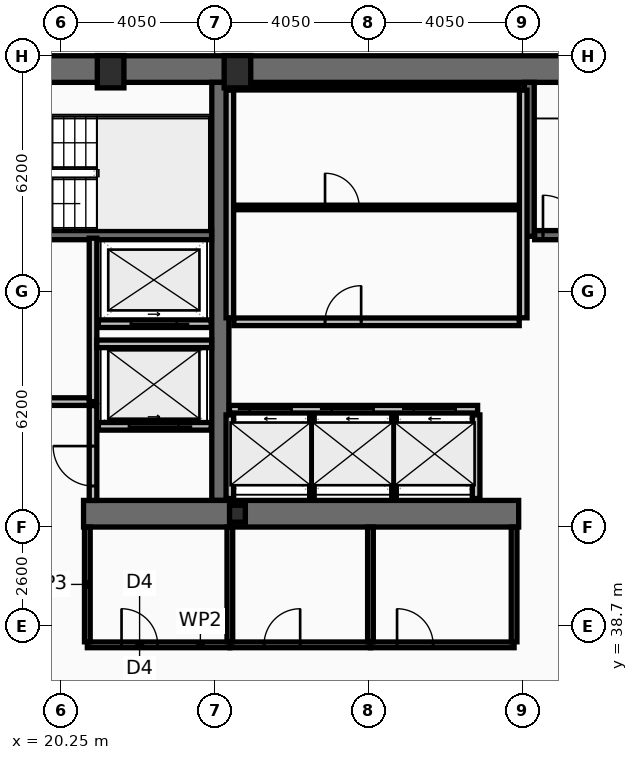
"""IFC4 building model, lengths in metres.
Left out: names, types, materials, properties, quantities, classifications, styles, units other than length and angle.
Written with IfcOpenShell. Run it as: python <this file> out.ifc"""

import sys

from ifc_helpers import new_model, si_unit, direction, frame, frame_2d, origin, origin_2d, place, context, subcontext, project, spatial, rectangle, hollow_rectangle, i_section, extrude, element, fill, save


model = new_model("IFC4")
c1 = context("Model", 3, precision=1e-05, world=origin(), true_north=direction((0.0, 1.0)))
c2 = subcontext(c1, "Body", "Model", "MODEL_VIEW")
j1 = project(units=[si_unit("LENGTHUNIT", "METRE"), si_unit("PLANEANGLEUNIT", "RADIAN")], contexts=[c1])
p1 = place(None, origin())
s1 = spatial("IfcSite", under=j1, at=p1, CompositionType="ELEMENT")
p2 = place(p1, origin())
s2 = spatial("IfcBuilding", under=s1, at=p2, CompositionType="ELEMENT")
p3 = place(p2, frame((0.0, 0.0, 132.6)))
s3 = spatial("IfcBuildingStorey", under=s2, at=p3, CompositionType="ELEMENT", Elevation=132.6)
p4 = place(p3, frame((16.2, 53.35, 0.0), z_axis=(0.0, 0.0, 1.0), x_axis=(1.0, 0.0, 0.0)))
e1 = element("IfcWall", 1, at=p4, inside=s3, PredefinedType="SHEAR", context=c2, shape_type="SweptSolid", body=[
    extrude(rectangle(XDim=40.5, YDim=0.7, at=frame_2d((20.25, 0.0))), origin(), (0.0, 0.0, 1.0), 3.44),
])
p5 = place(p3, frame((24.45, 42.0, 0.0), z_axis=(0.0, 0.0, 1.0), x_axis=(0.0, 1.0, 0.0)))
e2 = element("IfcWall", 2, at=p5, inside=s3, PredefinedType="SHEAR", context=c2, shape_type="SweptSolid", body=[
    extrude(rectangle(XDim=11.0, YDim=0.45, at=frame_2d((5.5, 0.0))), origin(), (0.0, 0.0, 1.0), 3.44),
])
p6 = place(p3, frame((32.3, 41.65, 0.0), z_axis=(0.0, 0.0, 1.0), x_axis=(-1.0, 0.0, 0.0)))
e3 = element("IfcWall", 3, at=p6, inside=s3, PredefinedType="SHEAR", context=c2, shape_type="SweptSolid", body=[
    extrude(rectangle(XDim=11.45, YDim=0.7, at=frame_2d((5.725, 0.0))), origin(), (0.0, 0.0, 1.0), 3.44),
])
p7 = place(p3, frame((32.58, 48.95, 0.0), z_axis=(0.0, 0.0, 1.0), x_axis=(0.0, 1.0, 0.0)))
e4 = element("IfcWall", 4, at=p7, inside=s3, PredefinedType="SHEAR", context=c2, shape_type="SweptSolid", body=[
    extrude(rectangle(XDim=4.05, YDim=0.26, at=frame_2d((2.025, 0.0))), origin(), (0.0, 0.0, 1.0), 3.44),
])
p8 = place(p3, frame((16.9, 48.98, 0.0), z_axis=(0.0, 0.0, 1.0), x_axis=(1.0, 0.0, 0.0)))
e5 = element("IfcWall", 5, at=p8, inside=s3, PredefinedType="SHEAR", context=c2, shape_type="SweptSolid", body=[
    extrude(rectangle(XDim=7.32, YDim=0.24, at=frame_2d((3.66, 0.0))), origin(), (0.0, 0.0, 1.0), 3.44),
])
p9 = place(p8, frame((0.22, 0.0, 0.0)))
e6 = element("IfcOpeningElement", 6, at=p9, cuts=e5, PredefinedType="OPENING", context=c2, shape_type="SweptSolid", body=[
    extrude(rectangle(XDim=1.05, YDim=2.15, at=frame_2d((0.525, 1.075))), frame((0.0, 0.13, 0.0), z_axis=(0.0, -1.0, 0.0), x_axis=(1.0, 0.0, 0.0)), (0.0, 0.0, 1.0), 0.26),
])
p10 = place(p3, frame((32.72, 48.98, 0.0), z_axis=(0.0, 0.0, 1.0), x_axis=(1.0, 0.0, 0.0)))
e7 = element("IfcWall", 7, at=p10, inside=s3, PredefinedType="SHEAR", context=c2, shape_type="SweptSolid", body=[
    extrude(rectangle(XDim=7.56, YDim=0.24, at=frame_2d((3.78, 0.0))), origin(), (0.0, 0.0, 1.0), 3.44),
])
p11 = place(p10, frame((0.22, 0.0, 0.0)))
e8 = element("IfcOpeningElement", 8, at=p11, cuts=e7, PredefinedType="OPENING", context=c2, shape_type="SweptSolid", body=[
    extrude(rectangle(XDim=1.05, YDim=2.15, at=frame_2d((0.525, 1.075))), frame((0.0, 0.13, 0.0), z_axis=(0.0, -1.0, 0.0), x_axis=(1.0, 0.0, 0.0)), (0.0, 0.0, 1.0), 0.26),
])
for number, where, z_axis, x_axis in (
    (9, (21.562, 53.28, 0.0), (0.0, 0.0, 1.0), (1.0, 0.0, 0.0)),
    (10, (24.9, 53.28, 0.0), (0.0, 0.0, 1.0), (1.0, 0.0, 0.0)),
):
    element("IfcColumn", number, at=place(p3, frame(where, z_axis=z_axis, x_axis=x_axis)), inside=s3, PredefinedType="COLUMN", context=c2, shape_type="SweptSolid", body=[
        extrude(hollow_rectangle(XDim=0.7, YDim=0.85, WallThickness=0.05, at=origin_2d()), origin(), (0.0, 0.0, 1.0), 3.6),
    ])
p12 = place(p3, frame((24.9, 41.65, 0.0), z_axis=(0.0, 0.0, 1.0), x_axis=(1.0, 0.0, 0.0)))
e11 = element("IfcColumn", 11, at=p12, inside=s3, PredefinedType="COLUMN", context=c2, shape_type="SweptSolid", body=[
    extrude(i_section(OverallWidth=0.416, OverallDepth=0.446, WebThickness=0.039, FlangeThickness=0.063, at=origin_2d()), origin(), (0.0, 0.0, 1.0), 3.6),
])
p13 = place(p3, frame((24.69, 44.4, 0.0), z_axis=(0.0, 0.0, 1.0), x_axis=(1.0, 0.0, 0.0)))
e12 = element("IfcWall", 12, at=p13, inside=s3, PredefinedType="PARTITIONING", context=c2, shape_type="SweptSolid", body=[
    extrude(rectangle(XDim=6.53, YDim=0.2, at=frame_2d((3.265, 0.0))), origin(), (0.0, 0.0, 1.0), 3.44),
])
p14 = place(p13, frame((0.53, 0.0, 0.0)))
e13 = element("IfcOpeningElement", 13, at=p14, cuts=e12, PredefinedType="OPENING", context=c2, shape_type="SweptSolid", body=[
    extrude(rectangle(XDim=1.1, YDim=2.18, at=frame_2d((0.55, 1.09))), frame((0.0, 0.11, 0.0), z_axis=(0.0, -1.0, 0.0), x_axis=(1.0, 0.0, 0.0)), (0.0, 0.0, 1.0), 0.22),
])
p15 = place(p13, frame((2.69, 0.0, 0.0)))
e14 = element("IfcOpeningElement", 14, at=p15, cuts=e12, PredefinedType="OPENING", context=c2, shape_type="SweptSolid", body=[
    extrude(rectangle(XDim=1.1, YDim=2.18, at=frame_2d((0.55, 1.09))), frame((0.0, 0.11, 0.0), z_axis=(0.0, -1.0, 0.0), x_axis=(1.0, 0.0, 0.0)), (0.0, 0.0, 1.0), 0.22),
])
p16 = place(p13, frame((4.85, 0.0, 0.0)))
e15 = element("IfcOpeningElement", 15, at=p16, cuts=e12, PredefinedType="OPENING", context=c2, shape_type="SweptSolid", body=[
    extrude(rectangle(XDim=1.1, YDim=2.18, at=frame_2d((0.55, 1.09))), frame((0.0, 0.11, 0.0), z_axis=(0.0, -1.0, 0.0), x_axis=(1.0, 0.0, 0.0)), (0.0, 0.0, 1.0), 0.22),
])
p17 = place(p3, frame((24.21, 43.95, 0.0), z_axis=(0.0, 0.0, 1.0), x_axis=(-1.0, 0.0, 0.0)))
e16 = element("IfcWall", 16, at=p17, inside=s3, PredefinedType="PARTITIONING", context=c2, shape_type="SweptSolid", body=[
    extrude(rectangle(XDim=2.97, YDim=0.2, at=frame_2d((1.485, 0.0))), origin(), (0.0, 0.0, 1.0), 3.44),
])
p18 = place(p17, frame((0.86, 0.0, 0.0)))
e17 = element("IfcOpeningElement", 17, at=p18, cuts=e16, PredefinedType="OPENING", context=c2, shape_type="SweptSolid", body=[
    extrude(rectangle(XDim=1.3, YDim=2.18, at=frame_2d((0.65, 1.09))), frame((0.0, 0.11, 0.0), z_axis=(0.0, -1.0, 0.0), x_axis=(1.0, 0.0, 0.0)), (0.0, 0.0, 1.0), 0.22),
])
p19 = place(p3, frame((24.21, 46.65, 0.0), z_axis=(0.0, 0.0, 1.0), x_axis=(-1.0, 0.0, 0.0)))
e18 = element("IfcWall", 18, at=p19, inside=s3, PredefinedType="PARTITIONING", context=c2, shape_type="SweptSolid", body=[
    extrude(rectangle(XDim=2.97, YDim=0.2, at=frame_2d((1.485, 0.0))), origin(), (0.0, 0.0, 1.0), 3.44),
])
p20 = place(p19, frame((0.91, 0.0, 0.0)))
e19 = element("IfcOpeningElement", 19, at=p20, cuts=e18, PredefinedType="OPENING", context=c2, shape_type="SweptSolid", body=[
    extrude(rectangle(XDim=1.2, YDim=2.18, at=frame_2d((0.6, 1.09))), frame((0.0, 0.11, 0.0), z_axis=(0.0, -1.0, 0.0), x_axis=(1.0, 0.0, 0.0)), (0.0, 0.0, 1.0), 0.22),
])
p21 = place(p3, frame((21.1, 44.6, 0.0), z_axis=(0.0, 0.0, 1.0), x_axis=(0.0, 1.0, 0.0)))
e20 = element("IfcWall", 20, at=p21, inside=s3, PredefinedType="PARTITIONING", context=c2, shape_type="SweptSolid", body=[
    extrude(rectangle(XDim=4.3, YDim=0.2, at=frame_2d((2.15, 0.0))), origin(), (0.0, 0.0, 1.0), 3.44),
])
p22 = place(p3, frame((16.9, 44.6, 0.0), z_axis=(0.0, 0.0, 1.0), x_axis=(1.0, 0.0, 0.0)))
e21 = element("IfcWall", 21, at=p22, inside=s3, PredefinedType="PARTITIONING", context=c2, shape_type="SweptSolid", body=[
    extrude(rectangle(XDim=4.1, YDim=0.2, at=frame_2d((2.05, 0.0))), origin(), (0.0, 0.0, 1.0), 3.44),
])
p23 = place(p22, frame((1.25, 0.0, 0.0)))
e22 = element("IfcOpeningElement", 22, at=p23, cuts=e21, PredefinedType="OPENING", context=c2, shape_type="SweptSolid", body=[
    extrude(rectangle(XDim=1.05, YDim=2.15, at=frame_2d((0.525, 1.075))), frame((0.0, 0.11, 0.0), z_axis=(0.0, -1.0, 0.0), x_axis=(1.0, 0.0, 0.0)), (0.0, 0.0, 1.0), 0.22),
])
p24 = place(p3, frame((21.2, 46.12, 0.0), z_axis=(0.0, 0.0, 1.0), x_axis=(1.0, 0.0, 0.0)))
e23 = element("IfcWall", 23, at=p24, inside=s3, PredefinedType="PARTITIONING", context=c2, shape_type="SweptSolid", body=[
    extrude(rectangle(XDim=3.02, YDim=0.2, at=frame_2d((1.51, 0.0))), origin(), (0.0, 0.0, 1.0), 3.44),
])
p25 = place(p3, frame((21.1, 42.0, 0.0), z_axis=(0.0, 0.0, 1.0), x_axis=(0.0, 1.0, 0.0)))
e24 = element("IfcWall", 24, at=p25, inside=s3, PredefinedType="PARTITIONING", context=c2, shape_type="SweptSolid", body=[
    extrude(rectangle(XDim=2.495, YDim=0.2, at=frame_2d((1.248, 0.0))), origin(), (0.0, 0.0, 1.0), 3.44),
])
p26 = place(p25, frame((0.38, 0.0, 0.0)))
e25 = element("IfcOpeningElement", 25, at=p26, cuts=e24, PredefinedType="OPENING", context=c2, shape_type="SweptSolid", body=[
    extrude(rectangle(XDim=1.05, YDim=2.15, at=frame_2d((0.525, 1.075))), frame((0.0, 0.11, 0.0), z_axis=(0.0, -1.0, 0.0), x_axis=(1.0, 0.0, 0.0)), (0.0, 0.0, 1.0), 0.22),
])
for number, where, z_axis, x_axis in (
    (26, (24.7, 46.805, 0.0), (0.0, 0.0, 1.0), (0.0, 1.0, 0.0)),
    (27, (32.42, 46.805, 0.0), (0.0, 0.0, 1.0), (0.0, 1.0, 0.0)),
):
    element("IfcWall", number, at=place(p3, frame(where, z_axis=z_axis, x_axis=x_axis)), inside=s3, PredefinedType="PARTITIONING", context=c2, shape_type="SweptSolid", body=[
        extrude(rectangle(XDim=5.99, YDim=0.2, at=frame_2d((2.995, 0.0))), origin(), (0.0, 0.0, 1.0), 3.44),
    ])
p27 = place(p3, frame((24.805, 52.86, 0.0), z_axis=(0.0, 0.0, 1.0), x_axis=(1.0, 0.0, 0.0)))
e28 = element("IfcWall", 28, at=p27, inside=s3, PredefinedType="PARTITIONING", context=c2, shape_type="SweptSolid", body=[
    extrude(rectangle(XDim=7.51, YDim=0.12, at=frame_2d((3.755, 0.0))), origin(), (0.0, 0.0, 1.0), 3.44),
])
p28 = place(p3, frame((24.805, 49.709, 0.0), z_axis=(0.0, 0.0, 1.0), x_axis=(1.0, 0.0, 0.0)))
e29 = element("IfcWall", 29, at=p28, inside=s3, PredefinedType="PARTITIONING", context=c2, shape_type="SweptSolid", body=[
    extrude(rectangle(XDim=7.51, YDim=0.12, at=frame_2d((3.755, 0.0))), origin(), (0.0, 0.0, 1.0), 3.44),
])
p29 = place(p28, frame((2.4, 0.0, 0.0)))
e30 = element("IfcOpeningElement", 30, at=p29, cuts=e29, PredefinedType="OPENING", context=c2, shape_type="SweptSolid", body=[
    extrude(rectangle(XDim=0.9, YDim=2.05, at=frame_2d((0.45, 1.025))), frame((0.0, 0.07, 0.0), z_axis=(0.0, -1.0, 0.0), x_axis=(1.0, 0.0, 0.0)), (0.0, 0.0, 1.0), 0.14),
])
p30 = place(p3, frame((24.805, 46.7, 0.0), z_axis=(0.0, 0.0, 1.0), x_axis=(1.0, 0.0, 0.0)))
e31 = element("IfcWall", 31, at=p30, inside=s3, PredefinedType="PARTITIONING", context=c2, shape_type="SweptSolid", body=[
    extrude(rectangle(XDim=7.51, YDim=0.2, at=frame_2d((3.755, 0.0))), origin(), (0.0, 0.0, 1.0), 3.44),
])
p31 = place(p30, frame((2.4, 0.0, 0.0)))
e32 = element("IfcOpeningElement", 32, at=p31, cuts=e31, PredefinedType="OPENING", context=c2, shape_type="SweptSolid", body=[
    extrude(rectangle(XDim=0.95, YDim=2.1, at=frame_2d((0.475, 1.05))), frame((0.0, 0.11, 0.0), z_axis=(0.0, -1.0, 0.0), x_axis=(1.0, 0.0, 0.0)), (0.0, 0.0, 1.0), 0.22),
])
for number, where, z_axis, x_axis in (
    (33, (24.7, 42.05, 0.0), (0.0, 0.0, 1.0), (0.0, 1.0, 0.0)),
    (34, (31.18, 42.05, 0.0), (0.0, 0.0, 1.0), (0.0, 1.0, 0.0)),
):
    element("IfcWall", number, at=place(p3, frame(where, z_axis=z_axis, x_axis=x_axis)), inside=s3, PredefinedType="PARTITIONING", context=c2, shape_type="SweptSolid", body=[
        extrude(rectangle(XDim=2.2, YDim=0.2, at=frame_2d((1.1, 0.0))), origin(), (0.0, 0.0, 1.0), 3.44),
    ])
for number, where, z_axis, x_axis in (
    (35, (26.86, 42.05, 0.0), (0.0, 0.0, 1.0), (0.0, 1.0, 0.0)),
    (36, (29.02, 42.05, 0.0), (0.0, 0.0, 1.0), (0.0, 1.0, 0.0)),
):
    element("IfcWall", number, at=place(p3, frame(where, z_axis=z_axis, x_axis=x_axis)), inside=s3, PredefinedType="PARTITIONING", context=c2, shape_type="SweptSolid", body=[
        extrude(rectangle(XDim=2.2, YDim=0.12, at=frame_2d((1.1, 0.0))), origin(), (0.0, 0.0, 1.0), 3.44),
    ])
p32 = place(p3, frame((20.95, 38.2, 0.0), z_axis=(0.0, 0.0, 1.0), x_axis=(1.0, 0.0, 0.0)))
e37 = element("IfcWall", 37, at=p32, inside=s3, PredefinedType="PARTITIONING", context=c2, shape_type="SweptSolid", body=[
    extrude(rectangle(XDim=3.75, YDim=0.15, at=frame_2d((1.875, 0.0))), origin(), (0.0, 0.0, 1.0), 2.73),
])
p33 = place(p32, frame((0.9, 0.0, 0.0)))
e38 = element("IfcOpeningElement", 38, at=p33, cuts=e37, PredefinedType="OPENING", context=c2, shape_type="SweptSolid", body=[
    extrude(rectangle(XDim=0.95, YDim=2.05, at=frame_2d((0.475, 1.025))), frame((0.0, 0.085, 0.0), z_axis=(0.0, -1.0, 0.0), x_axis=(1.0, 0.0, 0.0)), (0.0, 0.0, 1.0), 0.17),
])
p34 = place(p3, frame((24.7, 38.2, 0.0), z_axis=(0.0, 0.0, 1.0), x_axis=(1.0, 0.0, 0.0)))
e39 = element("IfcWall", 39, at=p34, inside=s3, PredefinedType="PARTITIONING", context=c2, shape_type="SweptSolid", body=[
    extrude(rectangle(XDim=3.7, YDim=0.15, at=frame_2d((1.85, 0.0))), origin(), (0.0, 0.0, 1.0), 2.73),
])
p35 = place(p34, frame((0.9, 0.0, 0.0)))
e40 = element("IfcOpeningElement", 40, at=p35, cuts=e39, PredefinedType="OPENING", context=c2, shape_type="SweptSolid", body=[
    extrude(rectangle(XDim=0.95, YDim=2.05, at=frame_2d((0.475, 1.025))), frame((0.0, 0.085, 0.0), z_axis=(0.0, -1.0, 0.0), x_axis=(1.0, 0.0, 0.0)), (0.0, 0.0, 1.0), 0.17),
])
p36 = place(p3, frame((28.4, 38.2, 0.0), z_axis=(0.0, 0.0, 1.0), x_axis=(1.0, 0.0, 0.0)))
e41 = element("IfcWall", 41, at=p36, inside=s3, PredefinedType="PARTITIONING", context=c2, shape_type="SweptSolid", body=[
    extrude(rectangle(XDim=3.78, YDim=0.15, at=frame_2d((1.89, 0.0))), origin(), (0.0, 0.0, 1.0), 2.73),
])
p37 = place(p36, frame((0.7, 0.0, 0.0)))
e42 = element("IfcOpeningElement", 42, at=p37, cuts=e41, PredefinedType="OPENING", context=c2, shape_type="SweptSolid", body=[
    extrude(rectangle(XDim=0.95, YDim=2.05, at=frame_2d((0.475, 1.025))), frame((0.0, 0.085, 0.0), z_axis=(0.0, -1.0, 0.0), x_axis=(1.0, 0.0, 0.0)), (0.0, 0.0, 1.0), 0.17),
])
p38 = place(p3, frame((20.95, 38.28, 0.0), z_axis=(0.0, 0.0, 1.0), x_axis=(0.0, 1.0, 0.0)))
e43 = element("IfcWall", 43, at=p38, inside=s3, PredefinedType="PARTITIONING", context=c2, shape_type="SweptSolid", body=[
    extrude(rectangle(XDim=3.02, YDim=0.15, at=frame_2d((1.51, 0.0))), origin(), (0.0, 0.0, 1.0), 3.44),
])
p39 = place(p3, frame((24.7, 38.28, 0.0), z_axis=(0.0, 0.0, 1.0), x_axis=(0.0, 1.0, 0.0)))
e44 = element("IfcWall", 44, at=p39, inside=s3, PredefinedType="PARTITIONING", context=c2, shape_type="SweptSolid", body=[
    extrude(rectangle(XDim=3.02, YDim=0.15, at=frame_2d((1.51, 0.0))), origin(), (0.0, 0.0, 1.0), 2.73),
])
for number, where, z_axis, x_axis in (
    (45, (28.4, 38.28, 0.0), (0.0, 0.0, 1.0), (0.0, 1.0, 0.0)),
    (46, (32.18, 38.28, 0.0), (0.0, 0.0, 1.0), (0.0, 1.0, 0.0)),
):
    element("IfcWall", number, at=place(p3, frame(where, z_axis=z_axis, x_axis=x_axis)), inside=s3, PredefinedType="PARTITIONING", context=c2, shape_type="SweptSolid", body=[
        extrude(rectangle(XDim=3.02, YDim=0.15, at=frame_2d((1.51, 0.0))), origin(), (0.0, 0.0, 1.0), 3.44),
    ])
p40 = place(p11, origin())
e47 = element("IfcDoor", 47, at=p40, inside=s3, OperationType="SINGLE_SWING_LEFT", PredefinedType="DOOR", context=c2, shape_type="SweptSolid", body=[
    extrude(rectangle(XDim=1.05, YDim=2.15, at=frame_2d((0.525, 1.075))), frame((0.0, 0.025, 0.0), z_axis=(0.0, -1.0, 0.0), x_axis=(1.0, 0.0, 0.0)), (0.0, 0.0, 1.0), 0.05),
])
fill(e8, e47)
p41 = place(p14, origin())
e48 = element("IfcDoor", 48, at=p41, inside=s3, OperationType="SLIDING_TO_LEFT", PredefinedType="DOOR", context=c2, shape_type="SweptSolid", body=[
    extrude(rectangle(XDim=1.1, YDim=2.18, at=frame_2d((0.55, 1.09))), frame((0.0, 0.025, 0.0), z_axis=(0.0, -1.0, 0.0), x_axis=(1.0, 0.0, 0.0)), (0.0, 0.0, 1.0), 0.05),
])
fill(e13, e48)
p42 = place(p15, origin())
e49 = element("IfcDoor", 49, at=p42, inside=s3, OperationType="SLIDING_TO_LEFT", PredefinedType="DOOR", context=c2, shape_type="SweptSolid", body=[
    extrude(rectangle(XDim=1.1, YDim=2.18, at=frame_2d((0.55, 1.09))), frame((0.0, 0.025, 0.0), z_axis=(0.0, -1.0, 0.0), x_axis=(1.0, 0.0, 0.0)), (0.0, 0.0, 1.0), 0.05),
])
fill(e14, e49)
p43 = place(p16, origin())
e50 = element("IfcDoor", 50, at=p43, inside=s3, OperationType="SLIDING_TO_LEFT", PredefinedType="DOOR", context=c2, shape_type="SweptSolid", body=[
    extrude(rectangle(XDim=1.1, YDim=2.18, at=frame_2d((0.55, 1.09))), frame((0.0, 0.025, 0.0), z_axis=(0.0, -1.0, 0.0), x_axis=(1.0, 0.0, 0.0)), (0.0, 0.0, 1.0), 0.05),
])
fill(e15, e50)
p44 = place(p18, origin())
e51 = element("IfcDoor", 51, at=p44, inside=s3, OperationType="SLIDING_TO_LEFT", PredefinedType="DOOR", context=c2, shape_type="SweptSolid", body=[
    extrude(rectangle(XDim=1.3, YDim=2.18, at=frame_2d((0.65, 1.09))), frame((0.0, 0.025, 0.0), z_axis=(0.0, -1.0, 0.0), x_axis=(1.0, 0.0, 0.0)), (0.0, 0.0, 1.0), 0.05),
])
fill(e17, e51)
p45 = place(p20, origin())
e52 = element("IfcDoor", 52, at=p45, inside=s3, OperationType="SLIDING_TO_LEFT", PredefinedType="DOOR", context=c2, shape_type="SweptSolid", body=[
    extrude(rectangle(XDim=1.2, YDim=2.18, at=frame_2d((0.6, 1.09))), frame((0.0, 0.025, 0.0), z_axis=(0.0, -1.0, 0.0), x_axis=(1.0, 0.0, 0.0)), (0.0, 0.0, 1.0), 0.05),
])
fill(e19, e52)
p46 = place(p26, origin())
e53 = element("IfcDoor", 53, at=p46, inside=s3, OperationType="SINGLE_SWING_RIGHT", PredefinedType="DOOR", context=c2, shape_type="SweptSolid", body=[
    extrude(rectangle(XDim=1.05, YDim=2.15, at=frame_2d((0.525, 1.075))), frame((0.0, 0.025, 0.0), z_axis=(0.0, -1.0, 0.0), x_axis=(1.0, 0.0, 0.0)), (0.0, 0.0, 1.0), 0.05),
])
fill(e25, e53)
p47 = place(p29, origin())
e54 = element("IfcDoor", 54, at=p47, inside=s3, OperationType="SINGLE_SWING_LEFT", PredefinedType="DOOR", context=c2, shape_type="SweptSolid", body=[
    extrude(rectangle(XDim=0.9, YDim=2.05, at=frame_2d((0.45, 1.025))), frame((0.0, 0.025, 0.0), z_axis=(0.0, -1.0, 0.0), x_axis=(1.0, 0.0, 0.0)), (0.0, 0.0, 1.0), 0.05),
])
fill(e30, e54)
p48 = place(p31, origin())
e55 = element("IfcDoor", 55, at=p48, inside=s3, OperationType="SINGLE_SWING_RIGHT", PredefinedType="DOOR", context=c2, shape_type="SweptSolid", body=[
    extrude(rectangle(XDim=0.95, YDim=2.1, at=frame_2d((0.475, 1.05))), frame((0.0, 0.025, 0.0), z_axis=(0.0, -1.0, 0.0), x_axis=(1.0, 0.0, 0.0)), (0.0, 0.0, 1.0), 0.05),
])
fill(e32, e55)
p49 = place(p33, origin())
e56 = element("IfcDoor", 56, at=p49, inside=s3, OperationType="SINGLE_SWING_LEFT", PredefinedType="DOOR", context=c2, shape_type="SweptSolid", body=[
    extrude(rectangle(XDim=0.95, YDim=2.05, at=frame_2d((0.475, 1.025))), frame((0.0, 0.025, 0.0), z_axis=(0.0, -1.0, 0.0), x_axis=(1.0, 0.0, 0.0)), (0.0, 0.0, 1.0), 0.05),
])
fill(e38, e56)
p50 = place(p35, origin())
e57 = element("IfcDoor", 57, at=p50, inside=s3, OperationType="SINGLE_SWING_RIGHT", PredefinedType="DOOR", context=c2, shape_type="SweptSolid", body=[
    extrude(rectangle(XDim=0.95, YDim=2.05, at=frame_2d((0.475, 1.025))), frame((0.0, 0.025, 0.0), z_axis=(0.0, -1.0, 0.0), x_axis=(1.0, 0.0, 0.0)), (0.0, 0.0, 1.0), 0.05),
])
fill(e40, e57)
p51 = place(p37, origin())
e58 = element("IfcDoor", 58, at=p51, inside=s3, OperationType="SINGLE_SWING_LEFT", PredefinedType="DOOR", context=c2, shape_type="SweptSolid", body=[
    extrude(rectangle(XDim=0.95, YDim=2.05, at=frame_2d((0.475, 1.025))), frame((0.0, 0.025, 0.0), z_axis=(0.0, -1.0, 0.0), x_axis=(1.0, 0.0, 0.0)), (0.0, 0.0, 1.0), 0.05),
])
fill(e42, e58)
save(model, sys.argv[1])
